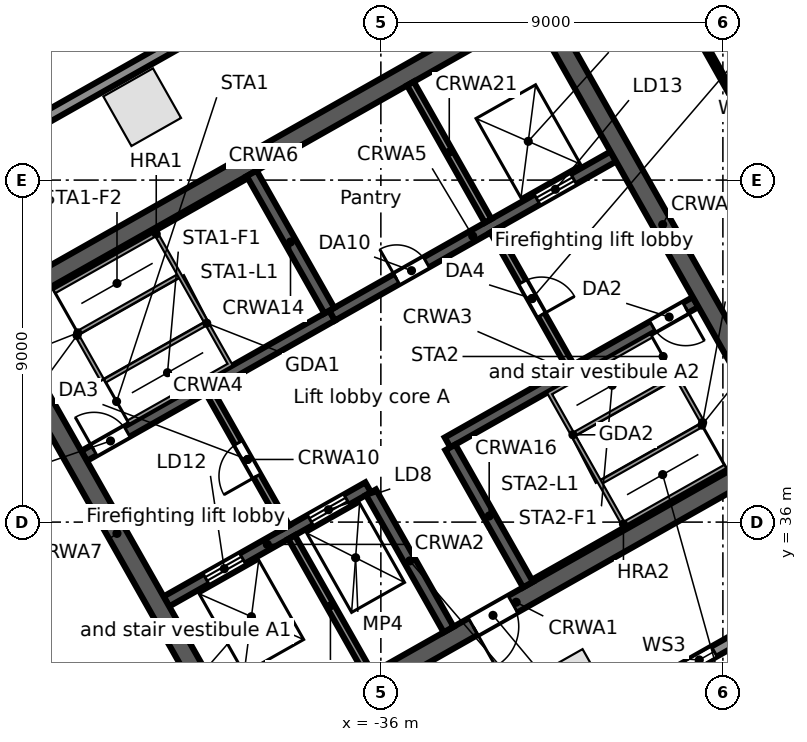
"""IFC4 building model, lengths in metres.
Left out: names, types, materials, properties, quantities, classifications, styles, units other than length and angle.
Written with IfcOpenShell. Run it as: python <this file> out.ifc"""

import sys

from ifc_helpers import new_model, si_unit, direction, frame, frame_2d, origin, origin_2d, place, context, subcontext, project, spatial, rectangle, extrude, element, fill, save


model = new_model("IFC4")
c1 = context("Model", 3, precision=1e-05, world=origin(), true_north=direction((0.0, 1.0)))
c2 = subcontext(c1, "Body", "Model", "MODEL_VIEW")
j1 = project(units=[si_unit("LENGTHUNIT", "METRE"), si_unit("PLANEANGLEUNIT", "RADIAN")], contexts=[c1])
p1 = place(None, origin())
s1 = spatial("IfcSite", under=j1, at=p1, CompositionType="ELEMENT")
p2 = place(p1, origin())
s2 = spatial("IfcBuilding", under=s1, at=p2, CompositionType="ELEMENT")
p3 = place(p2, frame((0.0, 0.0, 158.9)))
s3 = spatial("IfcBuildingStorey", under=s2, at=p3, CompositionType="ELEMENT", Elevation=158.9)
for number, where, z_axis, x_axis in (
    (1, (-42.28, 46.919, 0.0), (0.0, 0.0, 1.0), (-0.87, -0.492, 0.0)),
    (2, (-30.976, 31.635, 0.0), (0.0, 0.0, 1.0), (0.87, 0.492, 0.0)),
):
    element("IfcColumn", number, at=place(p3, frame(where, z_axis=z_axis, x_axis=x_axis)), inside=s3, PredefinedType="COLUMN", context=c2, shape_type="SweptSolid", body=[
        extrude(rectangle(XDim=1.5, YDim=1.5, at=origin_2d()), origin(), (0.0, 0.0, 1.0), 4.0),
    ])
p4 = place(p3, frame((-0.055, 47.969, 0.0), z_axis=(0.0, 0.0, 1.0), x_axis=(-0.870355730478, -0.492423499058, 0.0)))
e3 = element("IfcWall", 3, at=p4, inside=s3, PredefinedType="STANDARD", context=c2, shape_type="SweptSolid", body=[
    extrude(rectangle(XDim=43.75, YDim=0.3, at=frame_2d((21.875, 0.0))), origin(), (0.0, 0.0, 1.0), 3.68),
])
p5 = place(p4, frame((39.977, 0.0, 0.6)))
e4 = element("IfcOpeningElement", 4, at=p5, cuts=e3, PredefinedType="OPENING", context=c2, shape_type="SweptSolid", body=[
    extrude(rectangle(XDim=0.9, YDim=2.4, at=frame_2d((0.45, 1.2))), frame((0.0, 0.16, 0.0), z_axis=(0.0, -1.0, 0.0), x_axis=(1.0, 0.0, 0.0)), (0.0, 0.0, 1.0), 0.32),
])
p6 = place(p4, frame((37.338, 0.0, 0.0)))
e5 = element("IfcOpeningElement", 5, at=p6, cuts=e3, PredefinedType="OPENING", context=c2, shape_type="SweptSolid", body=[
    extrude(rectangle(XDim=1.8, YDim=2.4, at=frame_2d((0.9, 1.2))), frame((0.0, 0.16, 0.0), z_axis=(0.0, -1.0, 0.0), x_axis=(1.0, 0.0, 0.0)), (0.0, 0.0, 1.0), 0.32),
])
p7 = place(p4, frame((31.222, 0.0, 0.6)))
e6 = element("IfcOpeningElement", 6, at=p7, cuts=e3, PredefinedType="OPENING", context=c2, shape_type="SweptSolid", body=[
    extrude(rectangle(XDim=0.9, YDim=2.4, at=frame_2d((0.45, 1.2))), frame((0.0, 0.16, 0.0), z_axis=(0.0, -1.0, 0.0), x_axis=(1.0, 0.0, 0.0)), (0.0, 0.0, 1.0), 0.32),
])
p8 = place(p4, frame((28.584, 0.0, 0.0)))
e7 = element("IfcOpeningElement", 7, at=p8, cuts=e3, PredefinedType="OPENING", context=c2, shape_type="SweptSolid", body=[
    extrude(rectangle(XDim=1.8, YDim=2.4, at=frame_2d((0.9, 1.2))), frame((0.0, 0.16, 0.0), z_axis=(0.0, -1.0, 0.0), x_axis=(1.0, 0.0, 0.0)), (0.0, 0.0, 1.0), 0.32),
])
p9 = place(p4, frame((22.468, 0.0, 0.6)))
e8 = element("IfcOpeningElement", 8, at=p9, cuts=e3, PredefinedType="OPENING", context=c2, shape_type="SweptSolid", body=[
    extrude(rectangle(XDim=0.9, YDim=2.4, at=frame_2d((0.45, 1.2))), frame((0.0, 0.16, 0.0), z_axis=(0.0, -1.0, 0.0), x_axis=(1.0, 0.0, 0.0)), (0.0, 0.0, 1.0), 0.32),
])
p10 = place(p4, frame((19.829, 0.0, 0.0)))
e9 = element("IfcOpeningElement", 9, at=p10, cuts=e3, PredefinedType="OPENING", context=c2, shape_type="SweptSolid", body=[
    extrude(rectangle(XDim=1.8, YDim=2.4, at=frame_2d((0.9, 1.2))), frame((0.0, 0.16, 0.0), z_axis=(0.0, -1.0, 0.0), x_axis=(1.0, 0.0, 0.0)), (0.0, 0.0, 1.0), 0.32),
])
p11 = place(p4, frame((13.713, 0.0, 0.6)))
e10 = element("IfcOpeningElement", 10, at=p11, cuts=e3, PredefinedType="OPENING", context=c2, shape_type="SweptSolid", body=[
    extrude(rectangle(XDim=0.9, YDim=2.4, at=frame_2d((0.45, 1.2))), frame((0.0, 0.16, 0.0), z_axis=(0.0, -1.0, 0.0), x_axis=(1.0, 0.0, 0.0)), (0.0, 0.0, 1.0), 0.32),
])
p12 = place(p4, frame((11.075, 0.0, 0.0)))
e11 = element("IfcOpeningElement", 11, at=p12, cuts=e3, PredefinedType="OPENING", context=c2, shape_type="SweptSolid", body=[
    extrude(rectangle(XDim=1.8, YDim=2.4, at=frame_2d((0.9, 1.2))), frame((0.0, 0.16, 0.0), z_axis=(0.0, -1.0, 0.0), x_axis=(1.0, 0.0, 0.0)), (0.0, 0.0, 1.0), 0.32),
])
p13 = place(p4, frame((4.959, 0.0, 0.6)))
e12 = element("IfcOpeningElement", 12, at=p13, cuts=e3, PredefinedType="OPENING", context=c2, shape_type="SweptSolid", body=[
    extrude(rectangle(XDim=0.9, YDim=2.4, at=frame_2d((0.45, 1.2))), frame((0.0, 0.16, 0.0), z_axis=(0.0, -1.0, 0.0), x_axis=(1.0, 0.0, 0.0)), (0.0, 0.0, 1.0), 0.32),
])
p14 = place(p4, frame((2.32, 0.0, 0.0)))
e13 = element("IfcOpeningElement", 13, at=p14, cuts=e3, PredefinedType="OPENING", context=c2, shape_type="SweptSolid", body=[
    extrude(rectangle(XDim=1.8, YDim=2.4, at=frame_2d((0.9, 1.2))), frame((0.0, 0.16, 0.0), z_axis=(0.0, -1.0, 0.0), x_axis=(1.0, 0.0, 0.0)), (0.0, 0.0, 1.0), 0.32),
])
p15 = place(p3, frame((-58.745, 38.764, 0.0), z_axis=(0.0, 0.0, 1.0), x_axis=(0.870355811726, 0.492423355453, 0.0)))
e14 = element("IfcWall", 14, at=p15, inside=s3, PredefinedType="STANDARD", context=c2, shape_type="SweptSolid", body=[
    extrude(rectangle(XDim=64.025, YDim=0.3, at=frame_2d((32.013, 0.0))), origin(), (0.0, 0.0, 1.0), 3.68),
])
p16 = place(p15, frame((60.122, 0.0, 0.6)))
e15 = element("IfcOpeningElement", 15, at=p16, cuts=e14, PredefinedType="OPENING", context=c2, shape_type="SweptSolid", body=[
    extrude(rectangle(XDim=0.9, YDim=2.4, at=frame_2d((0.45, 1.2))), frame((0.0, 0.16, 0.0), z_axis=(0.0, -1.0, 0.0), x_axis=(1.0, 0.0, 0.0)), (0.0, 0.0, 1.0), 0.32),
])
p17 = place(p15, frame((50.992, 0.0, 0.6)))
e16 = element("IfcOpeningElement", 16, at=p17, cuts=e14, PredefinedType="OPENING", context=c2, shape_type="SweptSolid", body=[
    extrude(rectangle(XDim=0.9, YDim=2.4, at=frame_2d((0.45, 1.2))), frame((0.0, 0.16, 0.0), z_axis=(0.0, -1.0, 0.0), x_axis=(1.0, 0.0, 0.0)), (0.0, 0.0, 1.0), 0.32),
])
p18 = place(p15, frame((41.862, 0.0, 0.6)))
e17 = element("IfcOpeningElement", 17, at=p18, cuts=e14, PredefinedType="OPENING", context=c2, shape_type="SweptSolid", body=[
    extrude(rectangle(XDim=0.9, YDim=2.4, at=frame_2d((0.45, 1.2))), frame((0.0, 0.16, 0.0), z_axis=(0.0, -1.0, 0.0), x_axis=(1.0, 0.0, 0.0)), (0.0, 0.0, 1.0), 0.32),
])
p19 = place(p15, frame((32.732, 0.0, 0.6)))
e18 = element("IfcOpeningElement", 18, at=p19, cuts=e14, PredefinedType="OPENING", context=c2, shape_type="SweptSolid", body=[
    extrude(rectangle(XDim=0.9, YDim=2.4, at=frame_2d((0.45, 1.2))), frame((0.0, 0.16, 0.0), z_axis=(0.0, -1.0, 0.0), x_axis=(1.0, 0.0, 0.0)), (0.0, 0.0, 1.0), 0.32),
])
p20 = place(p15, frame((23.602, 0.0, 0.6)))
e19 = element("IfcOpeningElement", 19, at=p20, cuts=e14, PredefinedType="OPENING", context=c2, shape_type="SweptSolid", body=[
    extrude(rectangle(XDim=0.9, YDim=2.4, at=frame_2d((0.45, 1.2))), frame((0.0, 0.16, 0.0), z_axis=(0.0, -1.0, 0.0), x_axis=(1.0, 0.0, 0.0)), (0.0, 0.0, 1.0), 0.32),
])
p21 = place(p15, frame((14.472, 0.0, 0.6)))
e20 = element("IfcOpeningElement", 20, at=p21, cuts=e14, PredefinedType="OPENING", context=c2, shape_type="SweptSolid", body=[
    extrude(rectangle(XDim=0.9, YDim=2.4, at=frame_2d((0.45, 1.2))), frame((0.0, 0.16, 0.0), z_axis=(0.0, -1.0, 0.0), x_axis=(1.0, 0.0, 0.0)), (0.0, 0.0, 1.0), 0.32),
])
p22 = place(p15, frame((5.342, 0.0, 0.6)))
e21 = element("IfcOpeningElement", 21, at=p22, cuts=e14, PredefinedType="OPENING", context=c2, shape_type="SweptSolid", body=[
    extrude(rectangle(XDim=0.9, YDim=2.4, at=frame_2d((0.45, 1.2))), frame((0.0, 0.16, 0.0), z_axis=(0.0, -1.0, 0.0), x_axis=(1.0, 0.0, 0.0)), (0.0, 0.0, 1.0), 0.32),
])
p23 = place(p3, frame((-44.109, 26.504, 0.0), z_axis=(0.0, 0.0, 1.0), x_axis=(-0.857169502585, 0.515034410344, 0.0)))
e22 = element("IfcWall", 22, at=p23, inside=s3, PredefinedType="STANDARD", context=c2, shape_type="SweptSolid", body=[
    extrude(rectangle(XDim=17.127, YDim=0.3, at=frame_2d((8.563, 0.0))), origin(), (0.0, 0.0, 1.0), 3.68),
])
p24 = place(p23, frame((13.403, 0.0, 0.6)))
e23 = element("IfcOpeningElement", 23, at=p24, cuts=e22, PredefinedType="OPENING", context=c2, shape_type="SweptSolid", body=[
    extrude(rectangle(XDim=0.9, YDim=2.4, at=frame_2d((0.45, 1.2))), frame((0.0, 0.16, 0.0), z_axis=(0.0, -1.0, 0.0), x_axis=(1.0, 0.0, 0.0)), (0.0, 0.0, 1.0), 0.32),
])
p25 = place(p23, frame((4.903, 0.0, 0.6)))
e24 = element("IfcOpeningElement", 24, at=p25, cuts=e22, PredefinedType="OPENING", context=c2, shape_type="SweptSolid", body=[
    extrude(rectangle(XDim=0.9, YDim=2.4, at=frame_2d((0.45, 1.2))), frame((0.0, 0.16, 0.0), z_axis=(0.0, -1.0, 0.0), x_axis=(1.0, 0.0, 0.0)), (0.0, 0.0, 1.0), 0.32),
])
p26 = place(p3, frame((-39.838, 29.705, 0.0), z_axis=(0.0, 0.0, 1.0), x_axis=(0.870350116061, 0.492433422375, 0.0)))
e25 = element("IfcWall", 25, at=p26, inside=s3, PredefinedType="SOLIDWALL", context=c2, shape_type="SweptSolid", body=[
    extrude(rectangle(XDim=17.0, YDim=0.5, at=frame_2d((8.5, 0.0))), origin(), (0.0, 0.0, 1.0), 3.68),
])
p27 = place(p26, frame((7.2, 0.0, 0.0)))
e26 = element("IfcOpeningElement", 26, at=p27, cuts=e25, PredefinedType="OPENING", context=c2, shape_type="SweptSolid", body=[
    extrude(rectangle(XDim=1.2, YDim=2.1, at=frame_2d((0.6, 1.05))), frame((0.0, 0.26, 0.0), z_axis=(0.0, -1.0, 0.0), x_axis=(1.0, 0.0, 0.0)), (0.0, 0.0, 1.0), 0.52),
])
p28 = place(p3, frame((-41.643, 33.912, 0.0), z_axis=(0.0, 0.0, 1.0), x_axis=(0.870343599782, 0.492444939378, 0.0)))
e27 = element("IfcWall", 27, at=p28, inside=s3, PredefinedType="SOLIDWALL", context=c2, shape_type="SweptSolid", body=[
    extrude(rectangle(XDim=6.1, YDim=0.3, at=frame_2d((3.05, 0.0))), origin(), (0.0, 0.0, 1.0), 3.68),
])
p29 = place(p28, frame((1.2, 0.0, 0.0)))
e28 = element("IfcOpeningElement", 28, at=p29, cuts=e27, PredefinedType="OPENING", context=c2, shape_type="SweptSolid", body=[
    extrude(rectangle(XDim=1.1, YDim=2.1, at=frame_2d((0.55, 1.05))), frame((0.0, 0.16, 0.0), z_axis=(0.0, -1.0, 0.0), x_axis=(1.0, 0.0, 0.0)), (0.0, 0.0, 1.0), 0.32),
])
p30 = place(p28, frame((4.35, 0.0, 0.0)))
e29 = element("IfcOpeningElement", 29, at=p30, cuts=e27, PredefinedType="OPENING", context=c2, shape_type="SweptSolid", body=[
    extrude(rectangle(XDim=1.1, YDim=2.1, at=frame_2d((0.55, 1.05))), frame((0.0, 0.16, 0.0), z_axis=(0.0, -1.0, 0.0), x_axis=(1.0, 0.0, 0.0)), (0.0, 0.0, 1.0), 0.32),
])
p31 = place(p3, frame((-34.245, 38.097, 0.0), z_axis=(0.0, 0.0, 1.0), x_axis=(0.870364520461, 0.492407962489, 0.0)))
e30 = element("IfcWall", 30, at=p31, inside=s3, PredefinedType="SOLIDWALL", context=c2, shape_type="SweptSolid", body=[
    extrude(rectangle(XDim=7.5, YDim=0.3, at=frame_2d((3.75, 0.0))), origin(), (0.0, 0.0, 1.0), 3.68),
])
p32 = place(p31, frame((6.2, 0.0, 0.0)))
e31 = element("IfcOpeningElement", 31, at=p32, cuts=e30, PredefinedType="OPENING", context=c2, shape_type="SweptSolid", body=[
    extrude(rectangle(XDim=1.0, YDim=2.1, at=frame_2d((0.5, 1.05))), frame((0.0, 0.16, 0.0), z_axis=(0.0, -1.0, 0.0), x_axis=(1.0, 0.0, 0.0)), (0.0, 0.0, 1.0), 0.32),
])
p33 = place(p3, frame((-43.81, 37.741, 0.0), z_axis=(0.0, 0.0, 1.0), x_axis=(0.870350569555, 0.492432620848, 0.0)))
e32 = element("IfcWall", 32, at=p33, inside=s3, PredefinedType="SOLIDWALL", context=c2, shape_type="SweptSolid", body=[
    extrude(rectangle(XDim=7.5, YDim=0.3, at=frame_2d((3.75, 0.0))), origin(), (0.0, 0.0, 1.0), 3.68),
])
p34 = place(p33, frame((0.3, 0.0, 0.0)))
e33 = element("IfcOpeningElement", 33, at=p34, cuts=e32, PredefinedType="OPENING", context=c2, shape_type="SweptSolid", body=[
    extrude(rectangle(XDim=1.0, YDim=2.1, at=frame_2d((0.5, 1.05))), frame((0.0, 0.16, 0.0), z_axis=(0.0, -1.0, 0.0), x_axis=(1.0, 0.0, 0.0)), (0.0, 0.0, 1.0), 0.32),
])
p35 = place(p3, frame((-37.282, 41.435, 0.0), z_axis=(0.0, 0.0, 1.0), x_axis=(0.870356271124, 0.492422543467, 0.0)))
e34 = element("IfcWall", 34, at=p35, inside=s3, PredefinedType="SOLIDWALL", context=c2, shape_type="SweptSolid", body=[
    extrude(rectangle(XDim=8.5, YDim=0.3, at=frame_2d((4.25, 0.0))), origin(), (0.0, 0.0, 1.0), 3.68),
])
p36 = place(p35, frame((6.2, 0.0, 0.0)))
e35 = element("IfcOpeningElement", 35, at=p36, cuts=e34, PredefinedType="OPENING", context=c2, shape_type="SweptSolid", body=[
    extrude(rectangle(XDim=1.1, YDim=2.1, at=frame_2d((0.55, 1.05))), frame((0.0, 0.16, 0.0), z_axis=(0.0, -1.0, 0.0), x_axis=(1.0, 0.0, 0.0)), (0.0, 0.0, 1.0), 0.32),
])
p37 = place(p35, frame((1.95, 0.0, 0.0)))
e36 = element("IfcOpeningElement", 36, at=p37, cuts=e34, PredefinedType="OPENING", context=c2, shape_type="SweptSolid", body=[
    extrude(rectangle(XDim=0.9, YDim=2.1, at=frame_2d((0.45, 1.05))), frame((0.0, 0.16, 0.0), z_axis=(0.0, -1.0, 0.0), x_axis=(1.0, 0.0, 0.0)), (0.0, 0.0, 1.0), 0.32),
])
p38 = place(p3, frame((-46.486, 41.455, 0.0), z_axis=(0.0, 0.0, 1.0), x_axis=(0.870353598469, 0.492427267353, 0.0)))
e37 = element("IfcWall", 37, at=p38, inside=s3, PredefinedType="SOLIDWALL", context=c2, shape_type="SweptSolid", body=[
    extrude(rectangle(XDim=17.0, YDim=0.5, at=frame_2d((8.5, 0.0))), origin(), (0.0, 0.0, 1.0), 3.68),
])
p39 = place(p3, frame((-46.145, 41.361, 0.0), z_axis=(0.0, 0.0, 1.0), x_axis=(0.492435316254, -0.870349044525, 0.0)))
e38 = element("IfcWall", 38, at=p39, inside=s3, PredefinedType="SOLIDWALL", context=c2, shape_type="SweptSolid", body=[
    extrude(rectangle(XDim=13.0, YDim=0.5, at=frame_2d((6.5, 0.0))), origin(), (0.0, 0.0, 1.0), 3.68),
])
p40 = place(p3, frame((-38.349, 35.603, 0.0), z_axis=(0.0, 0.0, 1.0), x_axis=(0.492396453737, -0.870371031427, 0.0)))
e39 = element("IfcWall", 39, at=p40, inside=s3, PredefinedType="SOLIDWALL", context=c2, shape_type="SweptSolid", body=[
    extrude(rectangle(XDim=4.15, YDim=0.2, at=frame_2d((2.075, 0.0))), origin(), (0.0, 0.0, 1.0), 3.68),
])
p41 = place(p3, frame((-40.516, 39.433, 0.0), z_axis=(0.0, 0.0, 1.0), x_axis=(0.492453559952, -0.87033872216, 0.0)))
e40 = element("IfcWall", 40, at=p41, inside=s3, PredefinedType="PARTITIONING", context=c2, shape_type="SweptSolid", body=[
    extrude(rectangle(XDim=4.1, YDim=0.2, at=frame_2d((2.05, 0.0))), origin(), (0.0, 0.0, 1.0), 3.68),
])
p42 = place(p41, frame((1.55, 0.0, 0.0)))
e41 = element("IfcOpeningElement", 41, at=p42, cuts=e40, PredefinedType="OPENING", context=c2, shape_type="SweptSolid", body=[
    extrude(rectangle(XDim=1.0, YDim=2.1, at=frame_2d((0.5, 1.05))), frame((0.0, 0.11, 0.0), z_axis=(0.0, -1.0, 0.0), x_axis=(1.0, 0.0, 0.0)), (0.0, 0.0, 1.0), 0.22),
])
for number, where, z_axis, x_axis in (
    (42, (-36.26, 36.785, 0.0), (0.0, 0.0, 1.0), (0.492, -0.87, 0.0)),
    (43, (-39.399, 45.177, 0.0), (0.0, 0.0, 1.0), (0.492, -0.87, 0.0)),
    (44, (-34.171, 37.967, 0.0), (0.0, 0.0, 1.0), (0.492, -0.87, 0.0)),
):
    element("IfcWall", number, at=place(p3, frame(where, z_axis=z_axis, x_axis=x_axis)), inside=s3, PredefinedType="SOLIDWALL", context=c2, shape_type="SweptSolid", body=[
        extrude(rectangle(XDim=4.15, YDim=0.3, at=frame_2d((2.075, 0.0))), origin(), (0.0, 0.0, 1.0), 3.68),
    ])
p43 = place(p3, frame((-33.031, 43.667, 0.0), z_axis=(0.0, 0.0, 1.0), x_axis=(0.492408451753, -0.87036424366, 0.0)))
e45 = element("IfcWall", 45, at=p43, inside=s3, PredefinedType="PARTITIONING", context=c2, shape_type="SweptSolid", body=[
    extrude(rectangle(XDim=4.1, YDim=0.2, at=frame_2d((2.05, 0.0))), origin(), (0.0, 0.0, 1.0), 3.68),
])
p44 = place(p43, frame((1.55, 0.0, 0.0)))
e46 = element("IfcOpeningElement", 46, at=p44, cuts=e45, PredefinedType="OPENING", context=c2, shape_type="SweptSolid", body=[
    extrude(rectangle(XDim=1.0, YDim=2.1, at=frame_2d((0.5, 1.05))), frame((0.0, 0.11, 0.0), z_axis=(0.0, -1.0, 0.0), x_axis=(1.0, 0.0, 0.0)), (0.0, 0.0, 1.0), 0.22),
])
p45 = place(p3, frame((-35.222, 47.541, 0.0), z_axis=(0.0, 0.0, 1.0), x_axis=(0.492421666909, -0.870356767055, 0.0)))
e47 = element("IfcWall", 47, at=p45, inside=s3, PredefinedType="SOLIDWALL", context=c2, shape_type="SweptSolid", body=[
    extrude(rectangle(XDim=4.15, YDim=0.2, at=frame_2d((2.075, 0.0))), origin(), (0.0, 0.0, 1.0), 3.68),
])
p46 = place(p3, frame((-31.784, 49.486, 0.0), z_axis=(0.0, 0.0, 1.0), x_axis=(0.492435316254, -0.870349044525, 0.0)))
e48 = element("IfcWall", 48, at=p46, inside=s3, PredefinedType="SOLIDWALL", context=c2, shape_type="SweptSolid", body=[
    extrude(rectangle(XDim=13.0, YDim=0.5, at=frame_2d((6.5, 0.0))), origin(), (0.0, 0.0, 1.0), 3.68),
])
p47 = place(p3, frame((-30.785, 54.411, 0.0), z_axis=(0.0, 0.0, 1.0), x_axis=(0.490135904292, -0.871646026391, 0.0)))
e49 = element("IfcWall", 49, at=p47, inside=s3, PredefinedType="PARTITIONING", context=c2, shape_type="SweptSolid", body=[
    extrude(rectangle(XDim=17.295, YDim=0.125, at=frame_2d((8.647, 0.0))), origin(), (0.0, 0.0, 1.0), 2.852),
])
p48 = place(p7, origin())
e50 = element("IfcWindow", 50, at=p48, inside=s3, PartitioningType="SINGLE_PANEL", PredefinedType="WINDOW", context=c2, shape_type="SweptSolid", body=[
    extrude(rectangle(XDim=0.9, YDim=2.4, at=frame_2d((0.45, 1.2))), frame((0.0, 0.03, 0.0), z_axis=(0.0, -1.0, 0.0), x_axis=(1.0, 0.0, 0.0)), (0.0, 0.0, 1.0), 0.06),
])
fill(e6, e50)
p49 = place(p36, origin())
e51 = element("IfcDoor", 51, at=p49, inside=s3, OperationType="DOUBLE_DOOR_SLIDING", PredefinedType="DOOR", context=c2, shape_type="SweptSolid", body=[
    extrude(rectangle(XDim=1.1, YDim=2.1, at=frame_2d((0.55, 1.05))), frame((0.0, 0.025, 0.0), z_axis=(0.0, -1.0, 0.0), x_axis=(1.0, 0.0, 0.0)), (0.0, 0.0, 1.0), 0.05),
])
fill(e35, e51)
p50 = place(p29, origin())
e52 = element("IfcDoor", 52, at=p50, inside=s3, OperationType="DOUBLE_DOOR_SLIDING", PredefinedType="DOOR", context=c2, shape_type="SweptSolid", body=[
    extrude(rectangle(XDim=1.1, YDim=2.1, at=frame_2d((0.55, 1.05))), frame((0.0, 0.025, 0.0), z_axis=(0.0, -1.0, 0.0), x_axis=(1.0, 0.0, 0.0)), (0.0, 0.0, 1.0), 0.05),
])
fill(e28, e52)
p51 = place(p30, origin())
e53 = element("IfcDoor", 53, at=p51, inside=s3, OperationType="DOUBLE_DOOR_SLIDING", PredefinedType="DOOR", context=c2, shape_type="SweptSolid", body=[
    extrude(rectangle(XDim=1.1, YDim=2.1, at=frame_2d((0.55, 1.05))), frame((0.0, 0.025, 0.0), z_axis=(0.0, -1.0, 0.0), x_axis=(1.0, 0.0, 0.0)), (0.0, 0.0, 1.0), 0.05),
])
fill(e29, e53)
p52 = place(p34, origin())
e54 = element("IfcDoor", 54, at=p52, inside=s3, OperationType="SINGLE_SWING_LEFT", PredefinedType="DOOR", context=c2, shape_type="SweptSolid", body=[
    extrude(rectangle(XDim=1.0, YDim=2.1, at=frame_2d((0.5, 1.05))), frame((0.0, 0.025, 0.0), z_axis=(0.0, -1.0, 0.0), x_axis=(1.0, 0.0, 0.0)), (0.0, 0.0, 1.0), 0.05),
])
fill(e33, e54)
p53 = place(p32, frame((1.0, 0.0, 0.0), z_axis=(0.0, 0.0, 1.0), x_axis=(-1.0, 0.0, 0.0)))
e55 = element("IfcDoor", 55, at=p53, inside=s3, OperationType="SINGLE_SWING_LEFT", PredefinedType="DOOR", context=c2, shape_type="SweptSolid", body=[
    extrude(rectangle(XDim=1.0, YDim=2.1, at=frame_2d((0.5, 1.05))), frame((0.0, 0.025, 0.0), z_axis=(0.0, -1.0, 0.0), x_axis=(1.0, 0.0, 0.0)), (0.0, 0.0, 1.0), 0.05),
])
fill(e31, e55)
p54 = place(p42, frame((1.0, 0.0, 0.0), z_axis=(0.0, 0.0, 1.0), x_axis=(-1.0, 0.0, 0.0)))
e56 = element("IfcDoor", 56, at=p54, inside=s3, OperationType="SINGLE_SWING_LEFT", PredefinedType="DOOR", context=c2, shape_type="SweptSolid", body=[
    extrude(rectangle(XDim=1.0, YDim=2.1, at=frame_2d((0.5, 1.05))), frame((0.0, 0.025, 0.0), z_axis=(0.0, -1.0, 0.0), x_axis=(1.0, 0.0, 0.0)), (0.0, 0.0, 1.0), 0.05),
])
fill(e41, e56)
p55 = place(p44, origin())
e57 = element("IfcDoor", 57, at=p55, inside=s3, OperationType="SINGLE_SWING_RIGHT", PredefinedType="DOOR", context=c2, shape_type="SweptSolid", body=[
    extrude(rectangle(XDim=1.0, YDim=2.1, at=frame_2d((0.5, 1.05))), frame((0.0, 0.025, 0.0), z_axis=(0.0, -1.0, 0.0), x_axis=(1.0, 0.0, 0.0)), (0.0, 0.0, 1.0), 0.05),
])
fill(e46, e57)
p56 = place(p27, frame((1.2, 0.0, 0.0), z_axis=(0.0, 0.0, 1.0), x_axis=(-1.0, 0.0, 0.0)))
e58 = element("IfcDoor", 58, at=p56, inside=s3, OperationType="SINGLE_SWING_RIGHT", PredefinedType="DOOR", context=c2, shape_type="SweptSolid", body=[
    extrude(rectangle(XDim=1.2, YDim=2.1, at=frame_2d((0.6, 1.05))), frame((0.0, 0.025, 0.0), z_axis=(0.0, -1.0, 0.0), x_axis=(1.0, 0.0, 0.0)), (0.0, 0.0, 1.0), 0.05),
])
fill(e26, e58)
p57 = place(p37, origin())
e59 = element("IfcDoor", 59, at=p57, inside=s3, OperationType="SINGLE_SWING_LEFT", PredefinedType="DOOR", context=c2, shape_type="SweptSolid", body=[
    extrude(rectangle(XDim=0.9, YDim=2.1, at=frame_2d((0.45, 1.05))), frame((0.0, 0.025, 0.0), z_axis=(0.0, -1.0, 0.0), x_axis=(1.0, 0.0, 0.0)), (0.0, 0.0, 1.0), 0.05),
])
fill(e36, e59)
save(model, sys.argv[1])
